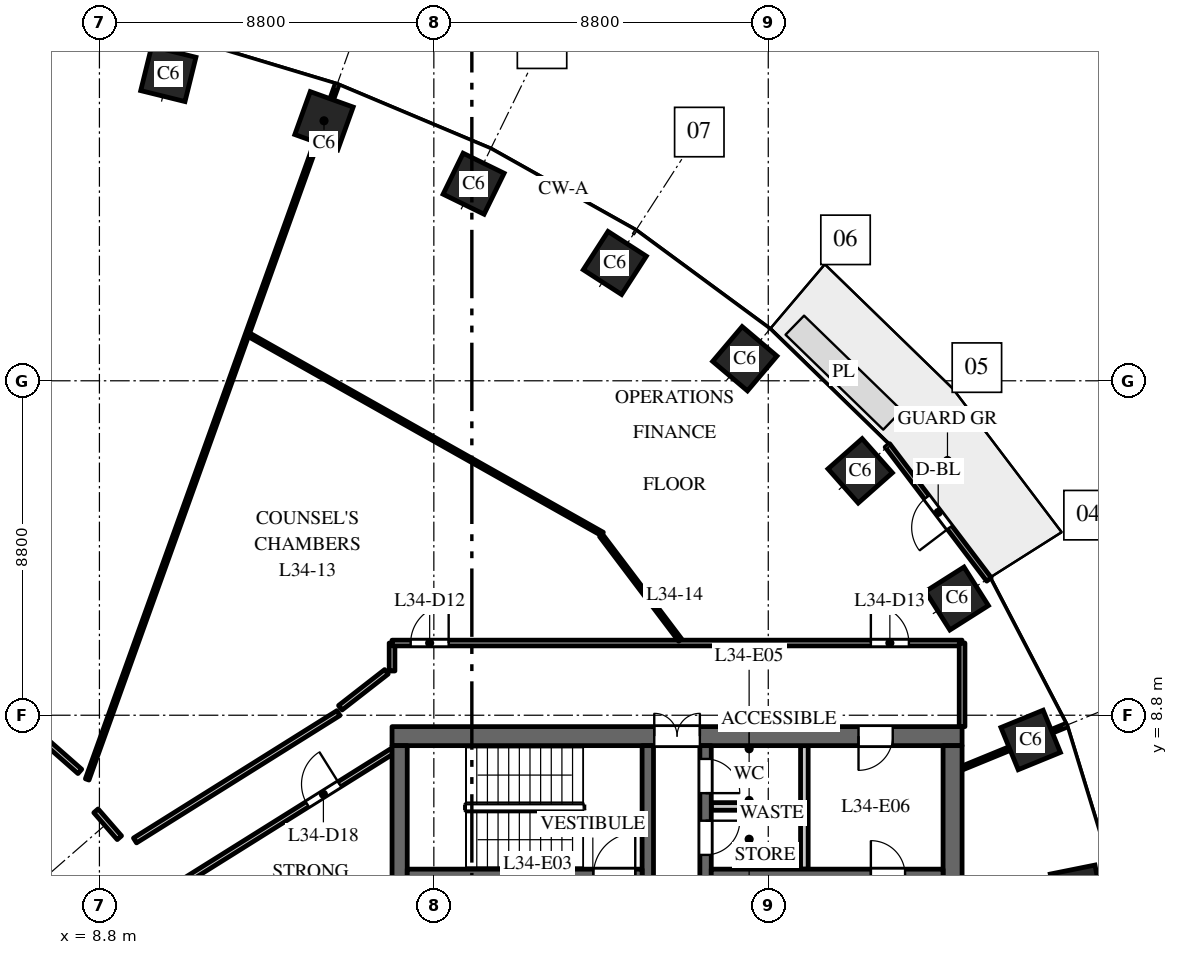
"""IFC4 building model, lengths in metres.
Left out: names, types, materials, properties, quantities, classifications, styles, units other than length and angle.
Written with IfcOpenShell. Run it as: python <this file> out.ifc"""

import sys

from ifc_helpers import new_model, si_unit, direction, frame, frame_2d, origin, origin_2d, place, context, subcontext, project, spatial, rectangle, extrude, element, fill, save


model = new_model("IFC4")
c1 = context("Model", 3, precision=1e-05, world=origin(), true_north=direction((0.0, 1.0)))
c2 = subcontext(c1, "Body", "Model", "MODEL_VIEW")
j1 = project(units=[si_unit("LENGTHUNIT", "METRE"), si_unit("PLANEANGLEUNIT", "RADIAN")], contexts=[c1])
p1 = place(None, origin())
s1 = spatial("IfcSite", under=j1, at=p1, CompositionType="ELEMENT")
p2 = place(p1, origin())
s2 = spatial("IfcBuilding", under=s1, at=p2, CompositionType="ELEMENT")
p3 = place(p2, frame((0.0, 0.0, 150.0)))
s3 = spatial("IfcBuildingStorey", under=s2, at=p3, CompositionType="ELEMENT", Elevation=150.0)
for number, where, z_axis, x_axis in (
    (1, (34.527, 4.151, 0.0), (0.0, 0.0, 1.0), (-0.197, 0.98, 0.0)),
    (2, (33.305, 8.149, 0.0), (0.0, 0.0, 1.0), (-0.379, 0.925, 0.0)),
    (3, (31.365, 11.871, 0.0), (0.0, 0.0, 1.0), (-0.535, 0.845, 0.0)),
    (4, (28.819, 15.23, 0.0), (0.0, 0.0, 1.0), (-0.663, 0.749, 0.0)),
    (5, (25.783, 18.18, 0.0), (0.0, 0.0, 1.0), (-0.763, 0.646, 0.0)),
    (6, (22.362, 20.7, 0.0), (0.0, 0.0, 1.0), (-0.84, 0.542, 0.0)),
    (7, (18.646, 22.785, 0.0), (0.0, 0.0, 1.0), (-0.898, 0.439, 0.0)),
    (8, (14.709, 24.441, 0.0), (0.0, 0.0, 1.0), (-0.941, 0.338, 0.0)),
    (9, (10.613, 25.674, 0.0), (0.0, 0.0, 1.0), (-0.971, 0.24, 0.0)),
):
    element("IfcColumn", number, at=place(p3, frame(where, z_axis=z_axis, x_axis=x_axis)), inside=s3, PredefinedType="COLUMN", context=c2, shape_type="SweptSolid", body=[
        extrude(rectangle(XDim=1.2, YDim=1.2, at=origin_2d()), origin(), (0.0, 0.0, 1.0), 4.0),
    ])
p4 = place(p3, frame((16.5, 8.25, 0.0), z_axis=(0.0, 0.0, 1.0), x_axis=(1.0, 0.0, 0.0)))
e10 = element("IfcWall", 10, at=p4, inside=s3, PredefinedType="SHEAR", context=c2, shape_type="SweptSolid", body=[
    extrude(rectangle(XDim=15.0, YDim=0.5, at=frame_2d((7.5, 0.0))), origin(), (0.0, 0.0, 1.0), 3.7),
])
p5 = place(p4, frame((6.9, 0.0, 0.0)))
e11 = element("IfcOpeningElement", 11, at=p5, cuts=e10, PredefinedType="OPENING", context=c2, shape_type="SweptSolid", body=[
    extrude(rectangle(XDim=1.2, YDim=2.1, at=frame_2d((0.6, 1.05))), frame((0.0, 0.26, 0.0), z_axis=(0.0, -1.0, 0.0), x_axis=(1.0, 0.0, 0.0)), (0.0, 0.0, 1.0), 0.52),
])
p6 = place(p4, frame((12.275, 0.0, 0.0)))
e12 = element("IfcOpeningElement", 12, at=p6, cuts=e10, PredefinedType="OPENING", context=c2, shape_type="SweptSolid", body=[
    extrude(rectangle(XDim=0.9, YDim=2.1, at=frame_2d((0.45, 1.05))), frame((0.0, 0.26, 0.0), z_axis=(0.0, -1.0, 0.0), x_axis=(1.0, 0.0, 0.0)), (0.0, 0.0, 1.0), 0.52),
])
p7 = place(p3, frame((24.75, -8.0, 0.0), z_axis=(0.0, 0.0, 1.0), x_axis=(0.0, 1.0, 0.0)))
e13 = element("IfcWall", 13, at=p7, inside=s3, PredefinedType="SHEAR", context=c2, shape_type="SweptSolid", body=[
    extrude(rectangle(XDim=16.0, YDim=0.3, at=frame_2d((8.0, 0.0))), origin(), (0.0, 0.0, 1.0), 3.7),
])
p8 = place(p7, frame((4.425, 0.0, 0.0)))
e14 = element("IfcOpeningElement", 14, at=p8, cuts=e13, PredefinedType="OPENING", context=c2, shape_type="SweptSolid", body=[
    extrude(rectangle(XDim=1.1, YDim=2.1, at=frame_2d((0.55, 1.05))), frame((0.0, 0.16, 0.0), z_axis=(0.0, -1.0, 0.0), x_axis=(1.0, 0.0, 0.0)), (0.0, 0.0, 1.0), 0.32),
])
p9 = place(p7, frame((7.45, 0.0, 0.0)))
e15 = element("IfcOpeningElement", 15, at=p9, cuts=e13, PredefinedType="OPENING", context=c2, shape_type="SweptSolid", body=[
    extrude(rectangle(XDim=1.1, YDim=2.1, at=frame_2d((0.55, 1.05))), frame((0.0, 0.16, 0.0), z_axis=(0.0, -1.0, 0.0), x_axis=(1.0, 0.0, 0.0)), (0.0, 0.0, 1.0), 0.32),
])
p10 = place(p7, frame((10.475, 0.0, 0.0)))
e16 = element("IfcOpeningElement", 16, at=p10, cuts=e13, PredefinedType="OPENING", context=c2, shape_type="SweptSolid", body=[
    extrude(rectangle(XDim=1.1, YDim=2.1, at=frame_2d((0.55, 1.05))), frame((0.0, 0.16, 0.0), z_axis=(0.0, -1.0, 0.0), x_axis=(1.0, 0.0, 0.0)), (0.0, 0.0, 1.0), 0.32),
])
p11 = place(p7, frame((13.125, 0.0, 0.0)))
e17 = element("IfcOpeningElement", 17, at=p11, cuts=e13, PredefinedType="OPENING", context=c2, shape_type="SweptSolid", body=[
    extrude(rectangle(XDim=0.9, YDim=2.1, at=frame_2d((0.45, 1.05))), frame((0.0, 0.16, 0.0), z_axis=(0.0, -1.0, 0.0), x_axis=(1.0, 0.0, 0.0)), (0.0, 0.0, 1.0), 0.32),
])
p12 = place(p7, frame((14.75, 0.0, 0.0)))
e18 = element("IfcOpeningElement", 18, at=p12, cuts=e13, PredefinedType="OPENING", context=c2, shape_type="SweptSolid", body=[
    extrude(rectangle(XDim=0.9, YDim=2.1, at=frame_2d((0.45, 1.05))), frame((0.0, 0.16, 0.0), z_axis=(0.0, -1.0, 0.0), x_axis=(1.0, 0.0, 0.0)), (0.0, 0.0, 1.0), 0.32),
])
p13 = place(p7, frame((1.35, 0.0, 0.0)))
e19 = element("IfcOpeningElement", 19, at=p13, cuts=e13, PredefinedType="OPENING", context=c2, shape_type="SweptSolid", body=[
    extrude(rectangle(XDim=0.9, YDim=2.1, at=frame_2d((0.45, 1.05))), frame((0.0, 0.16, 0.0), z_axis=(0.0, -1.0, 0.0), x_axis=(1.0, 0.0, 0.0)), (0.0, 0.0, 1.0), 0.32),
])
p14 = place(p3, frame((16.7, -8.0, 0.0), z_axis=(0.0, 0.0, 1.0), x_axis=(0.0, 1.0, 0.0)))
e20 = element("IfcWall", 20, at=p14, inside=s3, PredefinedType="SHEAR", context=c2, shape_type="SweptSolid", body=[
    extrude(rectangle(XDim=16.0, YDim=0.4, at=frame_2d((8.0, 0.0))), origin(), (0.0, 0.0, 1.0), 3.7),
])
p15 = place(p3, frame((31.25, -8.0, 0.0), z_axis=(0.0, 0.0, 1.0), x_axis=(0.0, 1.0, 0.0)))
e21 = element("IfcWall", 21, at=p15, inside=s3, PredefinedType="SHEAR", context=c2, shape_type="SweptSolid", body=[
    extrude(rectangle(XDim=16.0, YDim=0.5, at=frame_2d((8.0, 0.0))), origin(), (0.0, 0.0, 1.0), 3.7),
])
p16 = place(p3, frame((24.9, 4.6, 0.0), z_axis=(0.0, 0.0, 1.0), x_axis=(1.0, 0.0, 0.0)))
e22 = element("IfcWall", 22, at=p16, inside=s3, PredefinedType="SHEAR", context=c2, shape_type="SweptSolid", body=[
    extrude(rectangle(XDim=6.1, YDim=0.3, at=frame_2d((3.05, 0.0))), origin(), (0.0, 0.0, 1.0), 3.7),
])
p17 = place(p16, frame((4.2, 0.0, 0.0)))
e23 = element("IfcOpeningElement", 23, at=p17, cuts=e22, PredefinedType="OPENING", context=c2, shape_type="SweptSolid", body=[
    extrude(rectangle(XDim=0.9, YDim=2.1, at=frame_2d((0.45, 1.05))), frame((0.0, 0.16, 0.0), z_axis=(0.0, -1.0, 0.0), x_axis=(1.0, 0.0, 0.0)), (0.0, 0.0, 1.0), 0.32),
])
p18 = place(p3, frame((27.35, 4.75, 0.0), z_axis=(0.0, 0.0, 1.0), x_axis=(0.0, 1.0, 0.0)))
e24 = element("IfcWall", 24, at=p18, inside=s3, PredefinedType="PARTITIONING", context=c2, shape_type="SweptSolid", body=[
    extrude(rectangle(XDim=3.25, YDim=0.2, at=frame_2d((1.625, 0.0))), origin(), (0.0, 0.0, 1.0), 3.7),
])
p19 = place(p3, frame((24.9, 6.4, 0.0), z_axis=(0.0, 0.0, 1.0), x_axis=(1.0, 0.0, 0.0)))
e25 = element("IfcWall", 25, at=p19, inside=s3, PredefinedType="PARTITIONING", context=c2, shape_type="SweptSolid", body=[
    extrude(rectangle(XDim=2.35, YDim=0.2, at=frame_2d((1.175, 0.0))), origin(), (0.0, 0.0, 1.0), 3.7),
])
p20 = place(p3, frame((23.23, 2.25, 0.0), z_axis=(0.0, 0.0, 1.0), x_axis=(0.0, 1.0, 0.0)))
e26 = element("IfcWall", 26, at=p20, inside=s3, PredefinedType="SHEAR", context=c2, shape_type="SweptSolid", body=[
    extrude(rectangle(XDim=5.75, YDim=0.3, at=frame_2d((2.875, 0.0))), origin(), (0.0, 0.0, 1.0), 3.7),
])
p21 = place(p20, frame((0.6, 0.0, 0.0)))
e27 = element("IfcOpeningElement", 27, at=p21, cuts=e26, PredefinedType="OPENING", context=c2, shape_type="SweptSolid", body=[
    extrude(rectangle(XDim=1.0, YDim=2.1, at=frame_2d((0.5, 1.05))), frame((0.0, 0.16, 0.0), z_axis=(0.0, -1.0, 0.0), x_axis=(1.0, 0.0, 0.0)), (0.0, 0.0, 1.0), 0.32),
])
p22 = place(p3, frame((16.9, 4.6, 0.0), z_axis=(0.0, 0.0, 1.0), x_axis=(1.0, 0.0, 0.0)))
e28 = element("IfcWall", 28, at=p22, inside=s3, PredefinedType="SHEAR", context=c2, shape_type="SweptSolid", body=[
    extrude(rectangle(XDim=6.18, YDim=0.3, at=frame_2d((3.09, 0.0))), origin(), (0.0, 0.0, 1.0), 3.7),
])
p23 = place(p22, frame((4.9, 0.0, 0.0)))
e29 = element("IfcOpeningElement", 29, at=p23, cuts=e28, PredefinedType="OPENING", context=c2, shape_type="SweptSolid", body=[
    extrude(rectangle(XDim=1.1, YDim=2.1, at=frame_2d((0.55, 1.05))), frame((0.0, 0.16, 0.0), z_axis=(0.0, -1.0, 0.0), x_axis=(1.0, 0.0, 0.0)), (0.0, 0.0, 1.0), 0.32),
])
p24 = place(p3, frame((32.208, 12.374, 0.0), z_axis=(0.0, 0.0, 1.0), x_axis=(-0.604045763106, 0.796949632081, 0.0)))
e30 = element("IfcWall", 30, at=p24, inside=s3, PredefinedType="STANDARD", context=c2, shape_type="SweptSolid", body=[
    extrude(rectangle(XDim=4.423, YDim=0.15, at=frame_2d((2.212, 0.0))), origin(), (0.0, 0.0, 1.0), 3.7),
])
p25 = place(p24, frame((1.712, 0.0, 0.0)))
e31 = element("IfcOpeningElement", 31, at=p25, cuts=e30, PredefinedType="OPENING", context=c2, shape_type="SweptSolid", body=[
    extrude(rectangle(XDim=1.0, YDim=2.4, at=frame_2d((0.5, 1.2))), frame((0.0, 0.085, 0.0), z_axis=(0.0, -1.0, 0.0), x_axis=(1.0, 0.0, 0.0)), (0.0, 0.0, 1.0), 0.17),
])
p26 = place(p3, frame((7.458, 8.049, 0.0), z_axis=(0.0, 0.0, 1.0), x_axis=(0.75060787095, -0.660747927782, 0.0)))
e32 = element("IfcWall", 32, at=p26, inside=s3, PredefinedType="PARTITIONING", context=c2, shape_type="SweptSolid", body=[
    extrude(rectangle(XDim=1.1, YDim=0.15, at=frame_2d((0.55, 0.0))), origin(), (0.0, 0.0, 1.0), 3.7),
])
p27 = place(p3, frame((8.478, 7.111, 0.0), z_axis=(0.0, 0.0, 1.0), x_axis=(0.338361922043, 0.941016051782, 0.0)))
e33 = element("IfcWall", 33, at=p27, inside=s3, PredefinedType="PARTITIONING", context=c2, shape_type="SweptSolid", body=[
    extrude(rectangle(XDim=19.417, YDim=0.1, at=frame_2d((9.708, 0.0))), origin(), (0.0, 0.0, 1.0), 2.85),
])
p28 = place(p3, frame((8.709, 6.285, 0.0), z_axis=(0.0, 0.0, 1.0), x_axis=(0.656365478363, -0.754443078578, 0.0)))
e34 = element("IfcWall", 34, at=p28, inside=s3, PredefinedType="PARTITIONING", context=c2, shape_type="SweptSolid", body=[
    extrude(rectangle(XDim=0.938, YDim=0.15, at=frame_2d((0.469, 0.0))), origin(), (0.0, 0.0, 1.0), 3.7),
])
p29 = place(p3, frame((9.736, 5.505, 0.0), z_axis=(0.0, 0.0, 1.0), x_axis=(0.847611500167, 0.53061732424, 0.0)))
e35 = element("IfcWall", 35, at=p29, inside=s3, PredefinedType="PARTITIONING", context=c2, shape_type="SweptSolid", body=[
    extrude(rectangle(XDim=6.315, YDim=0.15, at=frame_2d((3.158, 0.0))), origin(), (0.0, 0.0, 1.0), 3.7),
])
p30 = place(p3, frame((10.752, 4.254, 0.0), z_axis=(0.0, 0.0, 1.0), x_axis=(0.847690706888, 0.530490777917, 0.0)))
e36 = element("IfcWall", 36, at=p30, inside=s3, PredefinedType="PARTITIONING", context=c2, shape_type="SweptSolid", body=[
    extrude(rectangle(XDim=6.781, YDim=0.15, at=frame_2d((3.39, 0.0))), origin(), (0.0, 0.0, 1.0), 3.7),
])
p31 = place(p30, frame((4.15, 0.0, 0.0)))
e37 = element("IfcOpeningElement", 37, at=p31, cuts=e36, PredefinedType="OPENING", context=c2, shape_type="SweptSolid", body=[
    extrude(rectangle(XDim=1.0, YDim=2.1, at=frame_2d((0.5, 1.05))), frame((0.0, 0.085, 0.0), z_axis=(0.0, -1.0, 0.0), x_axis=(1.0, 0.0, 0.0)), (0.0, 0.0, 1.0), 0.17),
])
p32 = place(p3, frame((12.737, 18.809, 0.0), z_axis=(0.0, 0.0, 1.0), x_axis=(0.871198990541, -0.490930054978, 0.0)))
e38 = element("IfcWall", 38, at=p32, inside=s3, PredefinedType="PARTITIONING", context=c2, shape_type="SweptSolid", body=[
    extrude(rectangle(XDim=10.674, YDim=0.1, at=frame_2d((5.337, 0.0))), origin(), (0.0, 0.0, 1.0), 3.7),
])
p33 = place(p3, frame((16.5, 9.964, 0.0), z_axis=(0.0, 0.0, 1.0), x_axis=(0.0, 1.0, 0.0)))
e39 = element("IfcWall", 39, at=p33, inside=s3, PredefinedType="PARTITIONING", context=c2, shape_type="SweptSolid", body=[
    extrude(rectangle(XDim=0.736, YDim=0.15, at=frame_2d((0.368, 0.0))), origin(), (0.0, 0.0, 1.0), 3.7),
])
p34 = place(p3, frame((16.5, 10.7, 0.0), z_axis=(0.0, 0.0, 1.0), x_axis=(1.0, 0.0, 0.0)))
e40 = element("IfcWall", 40, at=p34, inside=s3, PredefinedType="PARTITIONING", context=c2, shape_type="SweptSolid", body=[
    extrude(rectangle(XDim=15.0, YDim=0.15, at=frame_2d((7.5, 0.0))), origin(), (0.0, 0.0, 1.0), 2.75),
])
p35 = place(p34, frame((0.49, 0.0, 0.0)))
e41 = element("IfcOpeningElement", 41, at=p35, cuts=e40, PredefinedType="OPENING", context=c2, shape_type="SweptSolid", body=[
    extrude(rectangle(XDim=1.0, YDim=2.1, at=frame_2d((0.5, 1.05))), frame((0.0, 0.085, 0.0), z_axis=(0.0, -1.0, 0.0), x_axis=(1.0, 0.0, 0.0)), (0.0, 0.0, 1.0), 0.17),
])
p36 = place(p34, frame((12.6, 0.0, 0.0)))
e42 = element("IfcOpeningElement", 42, at=p36, cuts=e40, PredefinedType="OPENING", context=c2, shape_type="SweptSolid", body=[
    extrude(rectangle(XDim=1.0, YDim=2.1, at=frame_2d((0.5, 1.05))), frame((0.0, 0.085, 0.0), z_axis=(0.0, -1.0, 0.0), x_axis=(1.0, 0.0, 0.0)), (0.0, 0.0, 1.0), 0.17),
])
p37 = place(p3, frame((22.002, 13.53, 0.0), z_axis=(0.0, 0.0, 1.0), x_axis=(0.602805050744, -0.797888507749, 0.0)))
e43 = element("IfcWall", 43, at=p37, inside=s3, PredefinedType="PARTITIONING", context=c2, shape_type="SweptSolid", body=[
    extrude(rectangle(XDim=3.449, YDim=0.1, at=frame_2d((1.725, 0.0))), origin(), (0.0, 0.0, 1.0), 2.75),
])
p38 = place(p3, frame((31.5, 7.41, 0.0), z_axis=(0.0, 0.0, 1.0), x_axis=(0.925344112436, 0.379128307542, 0.0)))
e44 = element("IfcWall", 44, at=p38, inside=s3, PredefinedType="PARTITIONING", context=c2, shape_type="SweptSolid", body=[
    extrude(rectangle(XDim=2.954, YDim=0.1, at=frame_2d((1.477, 0.0))), origin(), (0.0, 0.0, 1.0), 3.7),
])
p39 = place(p3, frame((31.5, 8.5, 0.0), z_axis=(0.0, 0.0, 1.0), x_axis=(0.0, 1.0, 0.0)))
e45 = element("IfcWall", 45, at=p39, inside=s3, PredefinedType="PARTITIONING", context=c2, shape_type="SweptSolid", body=[
    extrude(rectangle(XDim=2.2, YDim=0.15, at=frame_2d((1.1, 0.0))), origin(), (0.0, 0.0, 1.0), 2.9),
])
p40 = place(p3, frame((15.139, 8.997, 0.0), z_axis=(0.0, 0.0, 1.0), x_axis=(0.788950226826, 0.614457109643, 0.0)))
e46 = element("IfcWall", 46, at=p40, inside=s3, PredefinedType="PARTITIONING", context=c2, shape_type="SweptSolid", body=[
    extrude(rectangle(XDim=1.538, YDim=0.15, at=frame_2d((0.769, 0.0))), origin(), (0.0, 0.0, 1.0), 3.7),
])
p41 = place(p23, origin())
e47 = element("IfcDoor", 47, at=p41, inside=s3, OperationType="SINGLE_SWING_LEFT", PredefinedType="DOOR", context=c2, shape_type="SweptSolid", body=[
    extrude(rectangle(XDim=1.1, YDim=2.1, at=frame_2d((0.55, 1.05))), frame((0.0, 0.025, 0.0), z_axis=(0.0, -1.0, 0.0), x_axis=(1.0, 0.0, 0.0)), (0.0, 0.0, 1.0), 0.05),
])
fill(e29, e47)
p42 = place(p5, origin())
e48 = element("IfcDoor", 48, at=p42, inside=s3, OperationType="DOUBLE_DOOR_DOUBLE_SWING", PredefinedType="DOOR", context=c2, shape_type="SweptSolid", body=[
    extrude(rectangle(XDim=1.2, YDim=2.1, at=frame_2d((0.6, 1.05))), frame((0.0, 0.025, 0.0), z_axis=(0.0, -1.0, 0.0), x_axis=(1.0, 0.0, 0.0)), (0.0, 0.0, 1.0), 0.05),
])
fill(e11, e48)
p43 = place(p11, origin())
e49 = element("IfcDoor", 49, at=p43, inside=s3, OperationType="SINGLE_SWING_RIGHT", PredefinedType="DOOR", context=c2, shape_type="SweptSolid", body=[
    extrude(rectangle(XDim=0.9, YDim=2.1, at=frame_2d((0.45, 1.05))), frame((0.0, 0.025, 0.0), z_axis=(0.0, -1.0, 0.0), x_axis=(1.0, 0.0, 0.0)), (0.0, 0.0, 1.0), 0.05),
])
fill(e17, e49)
p44 = place(p12, origin())
e50 = element("IfcDoor", 50, at=p44, inside=s3, OperationType="SINGLE_SWING_LEFT", PredefinedType="DOOR", context=c2, shape_type="SweptSolid", body=[
    extrude(rectangle(XDim=0.9, YDim=2.1, at=frame_2d((0.45, 1.05))), frame((0.0, 0.025, 0.0), z_axis=(0.0, -1.0, 0.0), x_axis=(1.0, 0.0, 0.0)), (0.0, 0.0, 1.0), 0.05),
])
fill(e18, e50)
p45 = place(p6, origin())
e51 = element("IfcDoor", 51, at=p45, inside=s3, OperationType="SINGLE_SWING_LEFT", PredefinedType="DOOR", context=c2, shape_type="SweptSolid", body=[
    extrude(rectangle(XDim=0.9, YDim=2.1, at=frame_2d((0.45, 1.05))), frame((0.0, 0.025, 0.0), z_axis=(0.0, -1.0, 0.0), x_axis=(1.0, 0.0, 0.0)), (0.0, 0.0, 1.0), 0.05),
])
fill(e12, e51)
p46 = place(p17, origin())
e52 = element("IfcDoor", 52, at=p46, inside=s3, OperationType="SINGLE_SWING_RIGHT", PredefinedType="DOOR", context=c2, shape_type="SweptSolid", body=[
    extrude(rectangle(XDim=0.9, YDim=2.1, at=frame_2d((0.45, 1.05))), frame((0.0, 0.025, 0.0), z_axis=(0.0, -1.0, 0.0), x_axis=(1.0, 0.0, 0.0)), (0.0, 0.0, 1.0), 0.05),
])
fill(e23, e52)
p47 = place(p25, origin())
e53 = element("IfcDoor", 53, at=p47, inside=s3, OperationType="SINGLE_SWING_LEFT", PredefinedType="DOOR", context=c2, shape_type="SweptSolid", body=[
    extrude(rectangle(XDim=1.0, YDim=2.4, at=frame_2d((0.5, 1.2))), frame((0.0, 0.025, 0.0), z_axis=(0.0, -1.0, 0.0), x_axis=(1.0, 0.0, 0.0)), (0.0, 0.0, 1.0), 0.05),
])
fill(e31, e53)
p48 = place(p35, origin())
e54 = element("IfcDoor", 54, at=p48, inside=s3, OperationType="SINGLE_SWING_RIGHT", PredefinedType="DOOR", context=c2, shape_type="SweptSolid", body=[
    extrude(rectangle(XDim=1.0, YDim=2.1, at=frame_2d((0.5, 1.05))), frame((0.0, 0.025, 0.0), z_axis=(0.0, -1.0, 0.0), x_axis=(1.0, 0.0, 0.0)), (0.0, 0.0, 1.0), 0.05),
])
fill(e41, e54)
p49 = place(p36, origin())
e55 = element("IfcDoor", 55, at=p49, inside=s3, OperationType="SINGLE_SWING_LEFT", PredefinedType="DOOR", context=c2, shape_type="SweptSolid", body=[
    extrude(rectangle(XDim=1.0, YDim=2.1, at=frame_2d((0.5, 1.05))), frame((0.0, 0.025, 0.0), z_axis=(0.0, -1.0, 0.0), x_axis=(1.0, 0.0, 0.0)), (0.0, 0.0, 1.0), 0.05),
])
fill(e42, e55)
p50 = place(p31, origin())
e56 = element("IfcDoor", 56, at=p50, inside=s3, OperationType="SINGLE_SWING_RIGHT", PredefinedType="DOOR", context=c2, shape_type="SweptSolid", body=[
    extrude(rectangle(XDim=1.0, YDim=2.1, at=frame_2d((0.5, 1.05))), frame((0.0, 0.025, 0.0), z_axis=(0.0, -1.0, 0.0), x_axis=(1.0, 0.0, 0.0)), (0.0, 0.0, 1.0), 0.05),
])
fill(e37, e56)
save(model, sys.argv[1])
